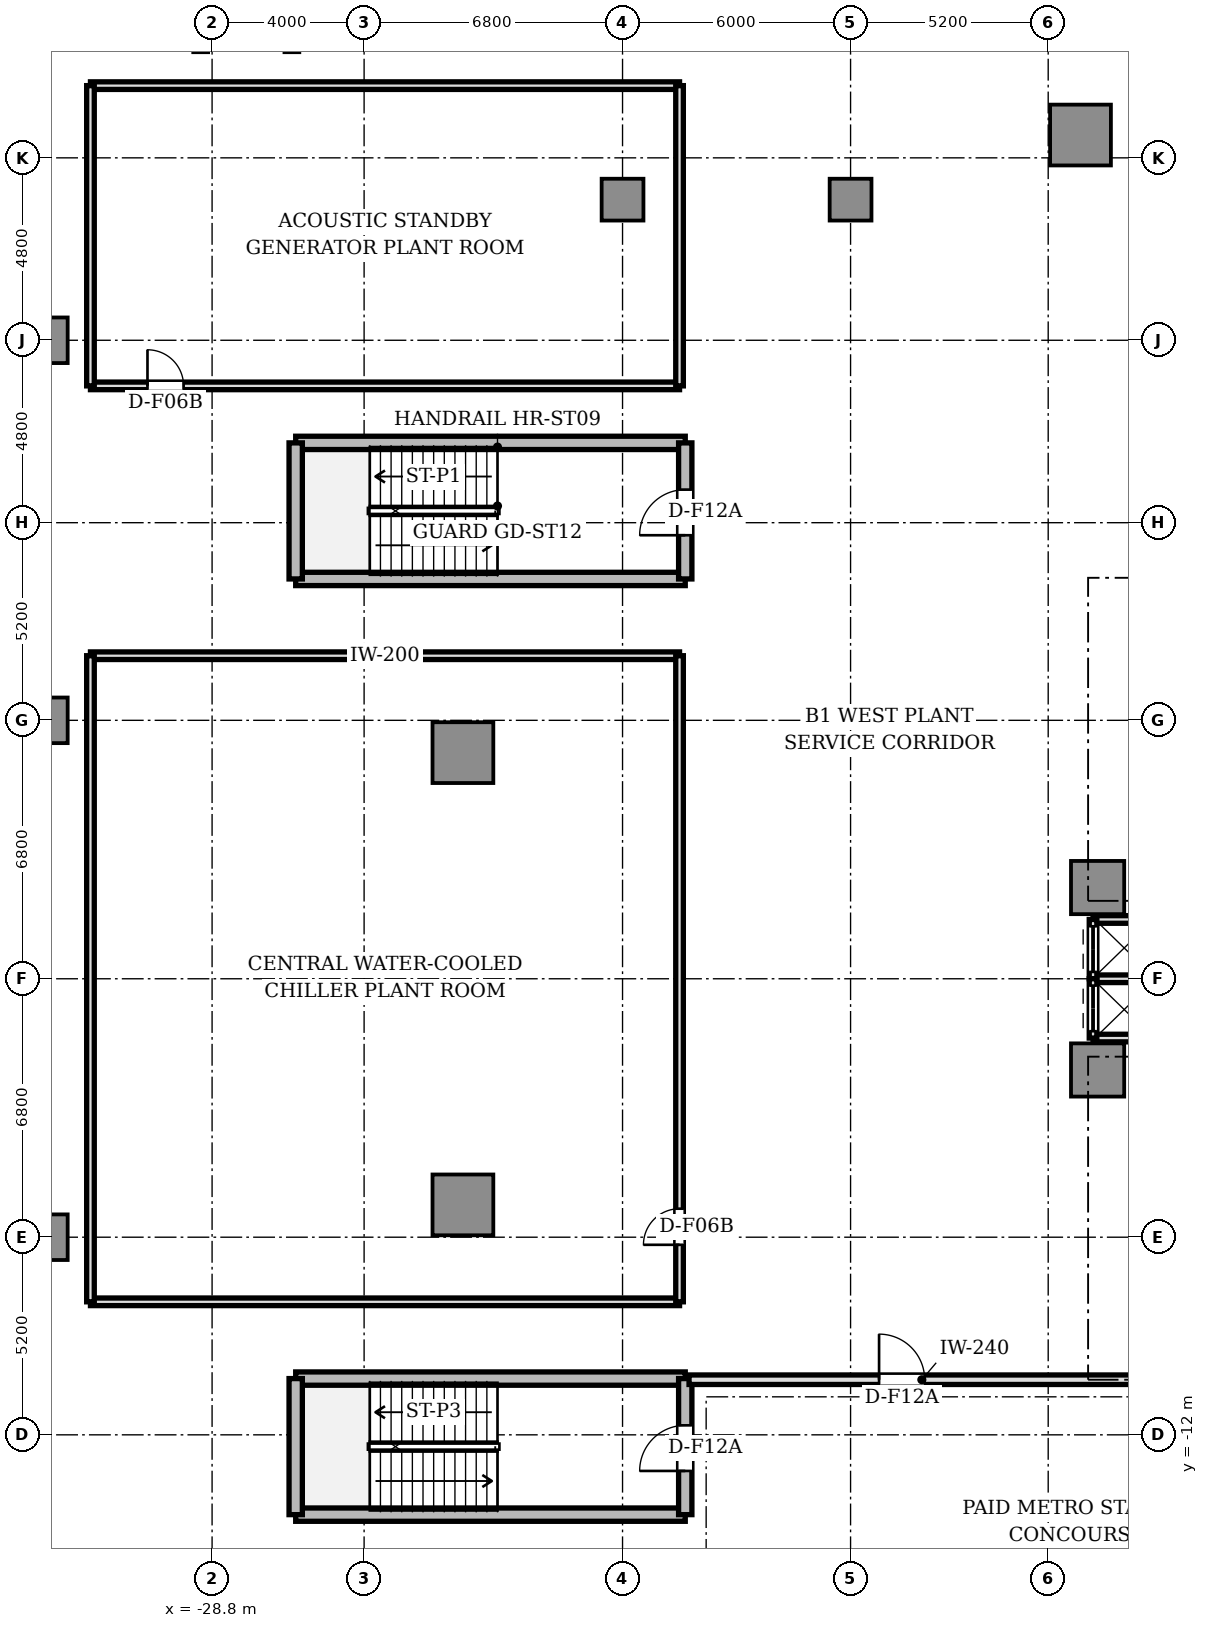
"""IFC4 building model, lengths in metres.
Left out: names, types, materials, properties, quantities, classifications, styles, units other than length and angle.
Written with IfcOpenShell. Run it as: python <this file> out.ifc"""

import sys

from ifc_helpers import new_model, si_unit, direction, frame, frame_2d, origin, origin_2d, place, context, subcontext, project, spatial, rectangle, circle, extrude, source, transform, mapped, element, fill, save


model = new_model("IFC4")
c1 = context("Model", 3, precision=1e-05, world=origin(), true_north=direction((0.0, 1.0)))
c2 = subcontext(c1, "Body", "Model", "MODEL_VIEW")
j1 = project(units=[si_unit("LENGTHUNIT", "METRE"), si_unit("PLANEANGLEUNIT", "RADIAN")], contexts=[c1])
p1 = place(None, origin())
s1 = spatial("IfcSite", under=j1, at=p1, CompositionType="ELEMENT")
p2 = place(p1, origin())
s2 = spatial("IfcBuilding", under=s1, at=p2, CompositionType="ELEMENT")
p3 = place(p2, frame((0.0, 0.0, -4.5)))
s3 = spatial("IfcBuildingStorey", under=s2, at=p3, CompositionType="ELEMENT", Elevation=-4.5)
m1 = source(origin(), c2, "Body", "SweptSolid", [
    extrude(rectangle(XDim=1.4, YDim=1.4, at=origin_2d()), origin(), (0.0, 0.0, 1.0), 4.1),
])
for number, where, z_axis, x_axis in (
    (1, (-5.5, 2.4, 0.0), (0.0, 0.0, 1.0), (1.0, 0.0, 0.0)),
    (2, (-5.5, -2.4, 0.0), (0.0, 0.0, 1.0), (1.0, 0.0, 0.0)),
):
    element("IfcColumn", number, at=place(p3, frame(where, z_axis=z_axis, x_axis=x_axis)), inside=s3, PredefinedType="COLUMN", context=c2, shape_type="MappedRepresentation", body=[
        mapped(m1, transform((0.0, 0.0, 0.0), scale=1.0)),
    ])
m2 = source(origin(), c2, "Body", "SweptSolid", [
    extrude(rectangle(XDim=1.6, YDim=1.6, at=origin_2d()), origin(), (0.0, 0.0, 1.0), 4.1),
])
for number, where, z_axis, x_axis in (
    (3, (-5.95, 22.2, 0.0), (0.0, 0.0, 1.0), (1.0, 0.0, 0.0)),
    (4, (-22.2, 5.95, 0.0), (0.0, 0.0, 1.0), (1.0, 0.0, 0.0)),
    (5, (-22.2, -5.95, 0.0), (0.0, 0.0, 1.0), (1.0, 0.0, 0.0)),
):
    element("IfcColumn", number, at=place(p3, frame(where, z_axis=z_axis, x_axis=x_axis)), inside=s3, PredefinedType="COLUMN", context=c2, shape_type="MappedRepresentation", body=[
        mapped(m2, transform((0.0, 0.0, 0.0), scale=1.0)),
    ])
m3 = source(origin(), c2, "Body", "SweptSolid", [
    extrude(rectangle(XDim=1.2, YDim=1.2, at=origin_2d()), origin(), (0.0, 0.0, 1.0), 4.1),
])
for number, where, z_axis, x_axis in (
    (6, (-33.2, -6.8, 0.0), (0.0, 0.0, 1.0), (1.0, 0.0, 0.0)),
    (7, (-33.2, 6.8, 0.0), (0.0, 0.0, 1.0), (1.0, 0.0, 0.0)),
    (8, (-33.2, 16.8, 0.0), (0.0, 0.0, 1.0), (1.0, 0.0, 0.0)),
):
    element("IfcColumn", number, at=place(p3, frame(where, z_axis=z_axis, x_axis=x_axis)), inside=s3, PredefinedType="COLUMN", context=c2, shape_type="MappedRepresentation", body=[
        mapped(m3, transform((0.0, 0.0, 0.0), scale=1.0)),
    ])
m4 = source(origin(), c2, "Body", "SweptSolid", [
    extrude(circle(Radius=0.55, at=origin_2d()), origin(), (0.0, 0.0, 1.0), 4.1),
])
for number, where, z_axis, x_axis in (
    (9, (-18.0, 20.5, 0.0), (0.0, 0.0, 1.0), (1.0, 0.0, 0.0)),
    (10, (-12.0, 20.5, 0.0), (0.0, 0.0, 1.0), (1.0, 0.0, 0.0)),
):
    element("IfcColumn", number, at=place(p3, frame(where, z_axis=z_axis, x_axis=x_axis)), inside=s3, PredefinedType="COLUMN", context=c2, shape_type="MappedRepresentation", body=[
        mapped(m4, transform((0.0, 0.0, 0.0), scale=1.0)),
    ])
for number, where, z_axis, x_axis in (
    (11, (-5.62, 1.56, 0.0), (0.0, 0.0, 1.0), (1.0, 0.0, 0.0)),
    (12, (-5.62, -1.56, 0.0), (0.0, 0.0, 1.0), (1.0, 0.0, 0.0)),
    (13, (-5.62, 0.0, 0.0), (0.0, 0.0, 1.0), (1.0, 0.0, 0.0)),
):
    element("IfcWall", number, at=place(p3, frame(where, z_axis=z_axis, x_axis=x_axis)), inside=s3, PredefinedType="SOLIDWALL", context=c2, shape_type="SweptSolid", body=[
        extrude(rectangle(XDim=1.64, YDim=0.2, at=frame_2d((0.82, 0.0))), origin(), (0.0, 0.0, 1.0), 3.65),
    ])
p4 = place(p3, frame((-5.62, 0.0, 0.0), z_axis=(0.0, 0.0, 1.0), x_axis=(0.0, 1.0, 0.0)))
e14 = element("IfcWall", 14, at=p4, inside=s3, PredefinedType="SOLIDWALL", context=c2, shape_type="SweptSolid", body=[
    extrude(rectangle(XDim=1.56, YDim=0.2, at=frame_2d((0.78, 0.0))), origin(), (0.0, 0.0, 1.0), 3.65),
])
p5 = place(p4, frame((0.18, 0.0, 0.0)))
e15 = element("IfcOpeningElement", 15, at=p5, cuts=e14, PredefinedType="OPENING", context=c2, shape_type="SweptSolid", body=[
    extrude(rectangle(XDim=1.2, YDim=2.2, at=frame_2d((0.6, 1.1))), frame((0.0, 0.11, 0.0), z_axis=(0.0, -1.0, 0.0), x_axis=(1.0, 0.0, 0.0)), (0.0, 0.0, 1.0), 0.22),
])
p6 = place(p3, frame((-5.62, -1.56, 0.0), z_axis=(0.0, 0.0, 1.0), x_axis=(0.0, 1.0, 0.0)))
e16 = element("IfcWall", 16, at=p6, inside=s3, PredefinedType="SOLIDWALL", context=c2, shape_type="SweptSolid", body=[
    extrude(rectangle(XDim=1.56, YDim=0.2, at=frame_2d((0.78, 0.0))), origin(), (0.0, 0.0, 1.0), 3.65),
])
p7 = place(p6, frame((0.18, 0.0, 0.0)))
e17 = element("IfcOpeningElement", 17, at=p7, cuts=e16, PredefinedType="OPENING", context=c2, shape_type="SweptSolid", body=[
    extrude(rectangle(XDim=1.2, YDim=2.2, at=frame_2d((0.6, 1.1))), frame((0.0, 0.11, 0.0), z_axis=(0.0, -1.0, 0.0), x_axis=(1.0, 0.0, 0.0)), (0.0, 0.0, 1.0), 0.22),
])
for number, where, z_axis, x_axis in (
    (18, (-26.6, 14.1, 0.0), (0.0, 0.0, 1.0), (1.0, 0.0, 0.0)),
    (19, (-26.6, 10.52, 0.0), (0.0, 0.0, 1.0), (1.0, 0.0, 0.0)),
):
    element("IfcWall", number, at=place(p3, frame(where, z_axis=z_axis, x_axis=x_axis)), inside=s3, PredefinedType="SHEAR", context=c2, shape_type="SweptSolid", body=[
        extrude(rectangle(XDim=10.25, YDim=0.35, at=frame_2d((5.125, 0.0))), origin(), (0.0, 0.0, 1.0), 4.1),
    ])
p8 = place(p3, frame((-26.6, 10.52, 0.0), z_axis=(0.0, 0.0, 1.0), x_axis=(0.0, 1.0, 0.0)))
e20 = element("IfcWall", 20, at=p8, inside=s3, PredefinedType="SHEAR", context=c2, shape_type="SweptSolid", body=[
    extrude(rectangle(XDim=3.58, YDim=0.35, at=frame_2d((1.79, 0.0))), origin(), (0.0, 0.0, 1.0), 4.1),
])
p9 = place(p3, frame((-16.35, 10.52, 0.0), z_axis=(0.0, 0.0, 1.0), x_axis=(0.0, 1.0, 0.0)))
e21 = element("IfcWall", 21, at=p9, inside=s3, PredefinedType="SHEAR", context=c2, shape_type="SweptSolid", body=[
    extrude(rectangle(XDim=3.58, YDim=0.35, at=frame_2d((1.79, 0.0))), origin(), (0.0, 0.0, 1.0), 4.1),
])
p10 = place(p9, frame((1.15, 0.0, 0.0)))
e22 = element("IfcOpeningElement", 22, at=p10, cuts=e21, PredefinedType="OPENING", context=c2, shape_type="SweptSolid", body=[
    extrude(rectangle(XDim=1.2, YDim=2.2, at=frame_2d((0.6, 1.1))), frame((0.0, 0.185, 0.0), z_axis=(0.0, -1.0, 0.0), x_axis=(1.0, 0.0, 0.0)), (0.0, 0.0, 1.0), 0.37),
])
for number, where, z_axis, x_axis in (
    (23, (-26.6, -10.52, 0.0), (0.0, 0.0, 1.0), (1.0, 0.0, 0.0)),
    (24, (-26.6, -14.1, 0.0), (0.0, 0.0, 1.0), (1.0, 0.0, 0.0)),
):
    element("IfcWall", number, at=place(p3, frame(where, z_axis=z_axis, x_axis=x_axis)), inside=s3, PredefinedType="SHEAR", context=c2, shape_type="SweptSolid", body=[
        extrude(rectangle(XDim=10.25, YDim=0.35, at=frame_2d((5.125, 0.0))), origin(), (0.0, 0.0, 1.0), 4.1),
    ])
p11 = place(p3, frame((-26.6, -14.1, 0.0), z_axis=(0.0, 0.0, 1.0), x_axis=(0.0, 1.0, 0.0)))
e25 = element("IfcWall", 25, at=p11, inside=s3, PredefinedType="SHEAR", context=c2, shape_type="SweptSolid", body=[
    extrude(rectangle(XDim=3.58, YDim=0.35, at=frame_2d((1.79, 0.0))), origin(), (0.0, 0.0, 1.0), 4.1),
])
p12 = place(p3, frame((-16.35, -14.1, 0.0), z_axis=(0.0, 0.0, 1.0), x_axis=(0.0, 1.0, 0.0)))
e26 = element("IfcWall", 26, at=p12, inside=s3, PredefinedType="SHEAR", context=c2, shape_type="SweptSolid", body=[
    extrude(rectangle(XDim=3.58, YDim=0.35, at=frame_2d((1.79, 0.0))), origin(), (0.0, 0.0, 1.0), 4.1),
])
p13 = place(p12, frame((1.15, 0.0, 0.0)))
e27 = element("IfcOpeningElement", 27, at=p13, cuts=e26, PredefinedType="OPENING", context=c2, shape_type="SweptSolid", body=[
    extrude(rectangle(XDim=1.2, YDim=2.2, at=frame_2d((0.6, 1.1))), frame((0.0, 0.185, 0.0), z_axis=(0.0, -1.0, 0.0), x_axis=(1.0, 0.0, 0.0)), (0.0, 0.0, 1.0), 0.37),
])
p14 = place(p3, frame((-16.25, -10.55, 0.0), z_axis=(0.0, 0.0, 1.0), x_axis=(1.0, 0.0, 0.0)))
e28 = element("IfcWall", 28, at=p14, inside=s3, PredefinedType="SOLIDWALL", context=c2, shape_type="SweptSolid", body=[
    extrude(rectangle(XDim=12.25, YDim=0.25, at=frame_2d((6.125, 0.0))), origin(), (0.0, 0.0, 1.0), 3.65),
])
p15 = place(p14, frame((5.0, 0.0, 0.0)))
e29 = element("IfcOpeningElement", 29, at=p15, cuts=e28, PredefinedType="OPENING", context=c2, shape_type="SweptSolid", body=[
    extrude(rectangle(XDim=1.2, YDim=2.2, at=frame_2d((0.6, 1.1))), frame((0.0, 0.135, 0.0), z_axis=(0.0, -1.0, 0.0), x_axis=(1.0, 0.0, 0.0)), (0.0, 0.0, 1.0), 0.27),
])
for number, where, z_axis, x_axis in (
    (30, (-32.0, 8.5, 0.0), (0.0, 0.0, 1.0), (1.0, 0.0, 0.0)),
    (31, (-32.0, -8.5, 0.0), (0.0, 0.0, 1.0), (1.0, 0.0, 0.0)),
):
    element("IfcWall", number, at=place(p3, frame(where, z_axis=z_axis, x_axis=x_axis)), inside=s3, PredefinedType="SOLIDWALL", context=c2, shape_type="SweptSolid", body=[
        extrude(rectangle(XDim=15.5, YDim=0.2, at=frame_2d((7.75, 0.0))), origin(), (0.0, 0.0, 1.0), 3.65),
    ])
p16 = place(p3, frame((-32.0, -8.5, 0.0), z_axis=(0.0, 0.0, 1.0), x_axis=(0.0, 1.0, 0.0)))
e32 = element("IfcWall", 32, at=p16, inside=s3, PredefinedType="SOLIDWALL", context=c2, shape_type="SweptSolid", body=[
    extrude(rectangle(XDim=17.0, YDim=0.2, at=frame_2d((8.5, 0.0))), origin(), (0.0, 0.0, 1.0), 3.65),
])
p17 = place(p3, frame((-16.5, -8.5, 0.0), z_axis=(0.0, 0.0, 1.0), x_axis=(0.0, 1.0, 0.0)))
e33 = element("IfcWall", 33, at=p17, inside=s3, PredefinedType="SOLIDWALL", context=c2, shape_type="SweptSolid", body=[
    extrude(rectangle(XDim=17.0, YDim=0.2, at=frame_2d((8.5, 0.0))), origin(), (0.0, 0.0, 1.0), 3.65),
])
p18 = place(p17, frame((1.5, 0.0, 0.0)))
e34 = element("IfcOpeningElement", 34, at=p18, cuts=e33, PredefinedType="OPENING", context=c2, shape_type="SweptSolid", body=[
    extrude(rectangle(XDim=0.95, YDim=2.15, at=frame_2d((0.475, 1.075))), frame((0.0, 0.11, 0.0), z_axis=(0.0, -1.0, 0.0), x_axis=(1.0, 0.0, 0.0)), (0.0, 0.0, 1.0), 0.22),
])
p19 = place(p3, frame((-32.0, 23.5, 0.0), z_axis=(0.0, 0.0, 1.0), x_axis=(1.0, 0.0, 0.0)))
e35 = element("IfcWall", 35, at=p19, inside=s3, PredefinedType="SOLIDWALL", context=c2, shape_type="SweptSolid", body=[
    extrude(rectangle(XDim=15.5, YDim=0.2, at=frame_2d((7.75, 0.0))), origin(), (0.0, 0.0, 1.0), 3.65),
])
p20 = place(p3, frame((-32.0, 15.6, 0.0), z_axis=(0.0, 0.0, 1.0), x_axis=(1.0, 0.0, 0.0)))
e36 = element("IfcWall", 36, at=p20, inside=s3, PredefinedType="SOLIDWALL", context=c2, shape_type="SweptSolid", body=[
    extrude(rectangle(XDim=15.5, YDim=0.2, at=frame_2d((7.75, 0.0))), origin(), (0.0, 0.0, 1.0), 3.65),
])
p21 = place(p20, frame((1.5, 0.0, 0.0)))
e37 = element("IfcOpeningElement", 37, at=p21, cuts=e36, PredefinedType="OPENING", context=c2, shape_type="SweptSolid", body=[
    extrude(rectangle(XDim=0.95, YDim=2.15, at=frame_2d((0.475, 1.075))), frame((0.0, 0.11, 0.0), z_axis=(0.0, -1.0, 0.0), x_axis=(1.0, 0.0, 0.0)), (0.0, 0.0, 1.0), 0.22),
])
p22 = place(p3, frame((-32.0, 15.6, 0.0), z_axis=(0.0, 0.0, 1.0), x_axis=(0.0, 1.0, 0.0)))
e38 = element("IfcWall", 38, at=p22, inside=s3, PredefinedType="SOLIDWALL", context=c2, shape_type="SweptSolid", body=[
    extrude(rectangle(XDim=7.9, YDim=0.2, at=frame_2d((3.95, 0.0))), origin(), (0.0, 0.0, 1.0), 3.65),
])
p23 = place(p3, frame((-16.5, 15.6, 0.0), z_axis=(0.0, 0.0, 1.0), x_axis=(0.0, 1.0, 0.0)))
e39 = element("IfcWall", 39, at=p23, inside=s3, PredefinedType="SOLIDWALL", context=c2, shape_type="SweptSolid", body=[
    extrude(rectangle(XDim=7.9, YDim=0.2, at=frame_2d((3.95, 0.0))), origin(), (0.0, 0.0, 1.0), 3.57),
])
m5 = source(origin(), c2, "Body", "SweptSolid", [
    extrude(rectangle(XDim=1.2, YDim=0.05, at=origin_2d()), origin(), (0.0, 0.0, 1.0), 2.2),
])
p24 = place(p5, frame((0.6, 0.0, 0.0)))
e40 = element("IfcDoor", 40, at=p24, inside=s3, OperationType="DOUBLE_DOOR_SLIDING", PredefinedType="DOOR", context=c2, shape_type="MappedRepresentation", body=[
    mapped(m5, transform((0.0, 0.0, 0.0), scale=1.0)),
])
fill(e15, e40)
p25 = place(p7, frame((0.6, 0.0, 0.0)))
e41 = element("IfcDoor", 41, at=p25, inside=s3, OperationType="DOUBLE_DOOR_SLIDING", PredefinedType="DOOR", context=c2, shape_type="MappedRepresentation", body=[
    mapped(m5, transform((0.0, 0.0, 0.0), scale=1.0)),
])
fill(e17, e41)
p26 = place(p10, frame((0.6, 0.0, 0.0)))
e42 = element("IfcDoor", 42, at=p26, inside=s3, OperationType="SINGLE_SWING_LEFT", PredefinedType="DOOR", context=c2, shape_type="MappedRepresentation", body=[
    mapped(m5, transform((0.0, 0.0, 0.0), scale=1.0)),
])
fill(e22, e42)
p27 = place(p13, frame((0.6, 0.0, 0.0)))
e43 = element("IfcDoor", 43, at=p27, inside=s3, OperationType="SINGLE_SWING_LEFT", PredefinedType="DOOR", context=c2, shape_type="MappedRepresentation", body=[
    mapped(m5, transform((0.0, 0.0, 0.0), scale=1.0)),
])
fill(e27, e43)
p28 = place(p15, frame((0.6, 0.0, 0.0)))
e44 = element("IfcDoor", 44, at=p28, inside=s3, OperationType="SINGLE_SWING_LEFT", PredefinedType="DOOR", context=c2, shape_type="MappedRepresentation", body=[
    mapped(m5, transform((0.0, 0.0, 0.0), scale=1.0)),
])
fill(e29, e44)
m6 = source(origin(), c2, "Body", "SweptSolid", [
    extrude(rectangle(XDim=0.95, YDim=0.05, at=origin_2d()), origin(), (0.0, 0.0, 1.0), 2.15),
])
p29 = place(p18, frame((0.475, 0.0, 0.0)))
e45 = element("IfcDoor", 45, at=p29, inside=s3, OperationType="SINGLE_SWING_LEFT", PredefinedType="DOOR", context=c2, shape_type="MappedRepresentation", body=[
    mapped(m6, transform((0.0, 0.0, 0.0), scale=1.0)),
])
fill(e34, e45)
p30 = place(p21, frame((0.475, 0.0, 0.0)))
e46 = element("IfcDoor", 46, at=p30, inside=s3, OperationType="SINGLE_SWING_LEFT", PredefinedType="DOOR", context=c2, shape_type="MappedRepresentation", body=[
    mapped(m6, transform((0.0, 0.0, 0.0), scale=1.0)),
])
fill(e37, e46)
save(model, sys.argv[1])
